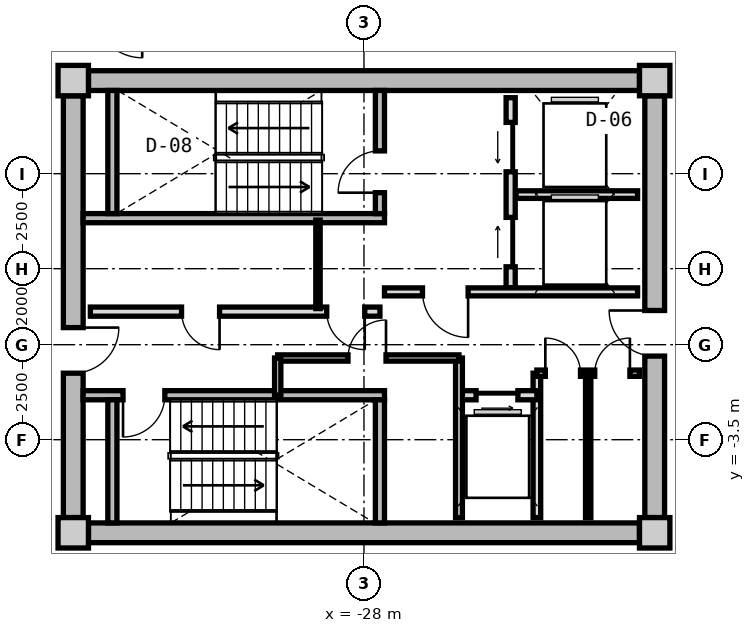
"""IFC4 building model, lengths in metres.
Left out: names, types, materials, properties, quantities, classifications, styles, units other than length and angle.
Written with IfcOpenShell. Run it as: python <this file> out.ifc"""

import sys

from ifc_helpers import new_model, si_unit, direction, frame, frame_2d, origin, origin_2d, place, context, subcontext, project, spatial, rectangle, extrude, source, transform, mapped, element, fill, save


model = new_model("IFC4")
c1 = context("Model", 3, precision=1e-05, world=origin(), true_north=direction((0.0, 1.0)))
c2 = subcontext(c1, "Body", "Model", "MODEL_VIEW")
j1 = project(units=[si_unit("LENGTHUNIT", "METRE"), si_unit("PLANEANGLEUNIT", "RADIAN")], contexts=[c1])
p1 = place(None, origin())
s1 = spatial("IfcSite", under=j1, at=p1, CompositionType="ELEMENT")
p2 = place(p1, origin())
s2 = spatial("IfcBuilding", under=s1, at=p2, CompositionType="ELEMENT")
p3 = place(p2, frame((0.0, 0.0, 199.8)))
s3 = spatial("IfcBuildingStorey", under=s2, at=p3, CompositionType="ELEMENT", Elevation=199.8)
m1 = source(origin(), c2, "Body", "SweptSolid", [
    extrude(rectangle(XDim=0.8, YDim=0.8, at=origin_2d()), origin(), (0.0, 0.0, 1.0), 4.0),
])
for number, where, z_axis, x_axis in (
    (1, (-35.65, -5.95, 0.0), (0.0, 0.0, 1.0), (1.0, 0.0, 0.0)),
    (2, (-20.35, -5.95, 0.0), (0.0, 0.0, 1.0), (1.0, 0.0, 0.0)),
    (3, (-20.35, 5.95, 0.0), (0.0, 0.0, 1.0), (1.0, 0.0, 0.0)),
    (4, (-35.65, 5.95, 0.0), (0.0, 0.0, 1.0), (1.0, 0.0, 0.0)),
):
    element("IfcColumn", number, at=place(p3, frame(where, z_axis=z_axis, x_axis=x_axis)), inside=s3, PredefinedType="COLUMN", context=c2, shape_type="MappedRepresentation", body=[
        mapped(m1, transform((0.0, 0.0, 0.0), x_axis=(1.0, 0.0, 0.0), y_axis=(0.0, 1.0, 0.0), z_axis=(0.0, 0.0, 1.0), scale=1.0)),
    ])
m2 = source(origin(), c2, "Body", "SweptSolid", [
    extrude(rectangle(XDim=14.5, YDim=0.52, at=frame_2d((7.25, 0.0))), origin(), (0.0, 0.0, 1.0), 3.71),
])
for number, where, z_axis, x_axis in (
    (5, (-35.25, 5.95, 0.0), (0.0, 0.0, 1.0), (1.0, 0.0, 0.0)),
    (6, (-20.75, -5.95, 0.0), (0.0, 0.0, 1.0), (-1.0, 0.0, 0.0)),
):
    element("IfcWall", number, at=place(p3, frame(where, z_axis=z_axis, x_axis=x_axis)), inside=s3, PredefinedType="SHEAR", context=c2, shape_type="MappedRepresentation", body=[
        mapped(m2, transform((0.0, 0.0, 0.0), x_axis=(1.0, 0.0, 0.0), y_axis=(0.0, 1.0, 0.0), z_axis=(0.0, 0.0, 1.0), scale=1.0)),
    ])
m3 = source(origin(), c2, "Body", "SweptSolid", [
    extrude(rectangle(XDim=11.1, YDim=0.52, at=frame_2d((5.55, 0.0))), origin(), (0.0, 0.0, 1.0), 3.71),
])
p4 = place(p3, frame((-35.65, -5.55, 0.0), z_axis=(0.0, 0.0, 1.0), x_axis=(0.0, 1.0, 0.0)))
e7 = element("IfcWall", 7, at=p4, inside=s3, PredefinedType="SHEAR", context=c2, shape_type="MappedRepresentation", body=[
    mapped(m3, transform((0.0, 0.0, 0.0), x_axis=(1.0, 0.0, 0.0), y_axis=(0.0, 1.0, 0.0), z_axis=(0.0, 0.0, 1.0), scale=1.0)),
])
p5 = place(p4, frame((3.8, 0.0, 0.0)))
e8 = element("IfcOpeningElement", 8, at=p5, cuts=e7, PredefinedType="OPENING", context=c2, shape_type="SweptSolid", body=[
    extrude(rectangle(XDim=1.2, YDim=2.15, at=frame_2d((0.6, 1.075))), frame((0.0, 0.27, 0.0), z_axis=(0.0, -1.0, 0.0), x_axis=(1.0, 0.0, 0.0)), (0.0, 0.0, 1.0), 0.54),
])
p6 = place(p3, frame((-20.35, 5.55, 0.0), z_axis=(0.0, 0.0, 1.0), x_axis=(0.0, -1.0, 0.0)))
e9 = element("IfcWall", 9, at=p6, inside=s3, PredefinedType="SHEAR", context=c2, shape_type="MappedRepresentation", body=[
    mapped(m3, transform((0.0, 0.0, 0.0), x_axis=(1.0, 0.0, 0.0), y_axis=(0.0, 1.0, 0.0), z_axis=(0.0, 0.0, 1.0), scale=1.0)),
])
p7 = place(p6, frame((5.65, 0.0, 0.0)))
e10 = element("IfcOpeningElement", 10, at=p7, cuts=e9, PredefinedType="OPENING", context=c2, shape_type="SweptSolid", body=[
    extrude(rectangle(XDim=1.2, YDim=2.15, at=frame_2d((0.6, 1.075))), frame((0.0, 0.27, 0.0), z_axis=(0.0, -1.0, 0.0), x_axis=(1.0, 0.0, 0.0)), (0.0, 0.0, 1.0), 0.54),
])
m4 = source(origin(), c2, "Body", "SweptSolid", [
    extrude(rectangle(XDim=7.93, YDim=0.24, at=frame_2d((3.965, 0.0))), origin(), (0.0, 0.0, 1.0), 3.71),
])
p8 = place(p3, frame((-35.39, 2.33, 0.0), z_axis=(0.0, 0.0, 1.0), x_axis=(1.0, 0.0, 0.0)))
e11 = element("IfcWall", 11, at=p8, inside=s3, PredefinedType="PARTITIONING", context=c2, shape_type="MappedRepresentation", body=[
    mapped(m4, transform((0.0, 0.0, 0.0), x_axis=(1.0, 0.0, 0.0), y_axis=(0.0, 1.0, 0.0), z_axis=(0.0, 0.0, 1.0), scale=1.0)),
])
m5 = source(origin(), c2, "Body", "SweptSolid", [
    extrude(rectangle(XDim=3.24, YDim=0.24, at=frame_2d((1.62, 0.0))), origin(), (0.0, 0.0, 1.0), 3.71),
])
p9 = place(p3, frame((-34.62, 2.45, 0.0), z_axis=(0.0, 0.0, 1.0), x_axis=(0.0, 1.0, 0.0)))
e12 = element("IfcWall", 12, at=p9, inside=s3, PredefinedType="PARTITIONING", context=c2, shape_type="MappedRepresentation", body=[
    mapped(m5, transform((0.0, 0.0, 0.0), x_axis=(1.0, 0.0, 0.0), y_axis=(0.0, 1.0, 0.0), z_axis=(0.0, 0.0, 1.0), scale=1.0)),
])
p10 = place(p3, frame((-27.58, 2.45, 0.0), z_axis=(0.0, 0.0, 1.0), x_axis=(0.0, 1.0, 0.0)))
e13 = element("IfcWall", 13, at=p10, inside=s3, PredefinedType="PARTITIONING", context=c2, shape_type="MappedRepresentation", body=[
    mapped(m5, transform((0.0, 0.0, 0.0), x_axis=(1.0, 0.0, 0.0), y_axis=(0.0, 1.0, 0.0), z_axis=(0.0, 0.0, 1.0), scale=1.0)),
])
p11 = place(p10, frame((0.55, 0.0, 0.0)))
e14 = element("IfcOpeningElement", 14, at=p11, cuts=e13, PredefinedType="OPENING", context=c2, shape_type="SweptSolid", body=[
    extrude(rectangle(XDim=1.1, YDim=2.15, at=frame_2d((0.55, 1.075))), frame((0.0, 0.13, 0.0), z_axis=(0.0, -1.0, 0.0), x_axis=(1.0, 0.0, 0.0)), (0.0, 0.0, 1.0), 0.26),
])
p12 = place(p3, frame((-35.39, -2.33, 0.0), z_axis=(0.0, 0.0, 1.0), x_axis=(1.0, 0.0, 0.0)))
e15 = element("IfcWall", 15, at=p12, inside=s3, PredefinedType="PARTITIONING", context=c2, shape_type="MappedRepresentation", body=[
    mapped(m4, transform((0.0, 0.0, 0.0), x_axis=(1.0, 0.0, 0.0), y_axis=(0.0, 1.0, 0.0), z_axis=(0.0, 0.0, 1.0), scale=1.0)),
])
p13 = place(p12, frame((1.05, 0.0, 0.0)))
e16 = element("IfcOpeningElement", 16, at=p13, cuts=e15, PredefinedType="OPENING", context=c2, shape_type="SweptSolid", body=[
    extrude(rectangle(XDim=1.1, YDim=2.15, at=frame_2d((0.55, 1.075))), frame((0.0, 0.13, 0.0), z_axis=(0.0, -1.0, 0.0), x_axis=(1.0, 0.0, 0.0)), (0.0, 0.0, 1.0), 0.26),
])
for number, where, z_axis, x_axis in (
    (17, (-34.62, -5.69, 0.0), (0.0, 0.0, 1.0), (0.0, 1.0, 0.0)),
    (18, (-27.58, -5.69, 0.0), (0.0, 0.0, 1.0), (0.0, 1.0, 0.0)),
):
    element("IfcWall", number, at=place(p3, frame(where, z_axis=z_axis, x_axis=x_axis)), inside=s3, PredefinedType="PARTITIONING", context=c2, shape_type="MappedRepresentation", body=[
        mapped(m5, transform((0.0, 0.0, 0.0), x_axis=(1.0, 0.0, 0.0), y_axis=(0.0, 1.0, 0.0), z_axis=(0.0, 0.0, 1.0), scale=1.0)),
    ])
m6 = source(origin(), c2, "Body", "SweptSolid", [
    extrude(rectangle(XDim=5.0, YDim=0.24, at=frame_2d((2.5, 0.0))), origin(), (0.0, 0.0, 1.0), 3.695),
])
p14 = place(p3, frame((-24.14, 0.5, 0.0), z_axis=(0.0, 0.0, 1.0), x_axis=(0.0, 1.0, 0.0)))
e19 = element("IfcWall", 19, at=p14, inside=s3, PredefinedType="PARTITIONING", context=c2, shape_type="MappedRepresentation", body=[
    mapped(m6, transform((0.0, 0.0, 0.0), x_axis=(1.0, 0.0, 0.0), y_axis=(0.0, 1.0, 0.0), z_axis=(0.0, 0.0, 1.0), scale=1.0)),
])
p15 = place(p14, frame((3.05, 0.0, 0.0)))
e20 = element("IfcOpeningElement", 20, at=p15, cuts=e19, PredefinedType="OPENING", context=c2, shape_type="SweptSolid", body=[
    extrude(rectangle(XDim=1.3, YDim=2.2, at=frame_2d((0.65, 1.1))), frame((0.0, 0.13, 0.0), z_axis=(0.0, -1.0, 0.0), x_axis=(1.0, 0.0, 0.0)), (0.0, 0.0, 1.0), 0.26),
])
p16 = place(p14, frame((0.55, 0.0, 0.0)))
e21 = element("IfcOpeningElement", 21, at=p16, cuts=e19, PredefinedType="OPENING", context=c2, shape_type="SweptSolid", body=[
    extrude(rectangle(XDim=1.3, YDim=2.2, at=frame_2d((0.65, 1.1))), frame((0.0, 0.13, 0.0), z_axis=(0.0, -1.0, 0.0), x_axis=(1.0, 0.0, 0.0)), (0.0, 0.0, 1.0), 0.26),
])
m7 = source(origin(), c2, "Body", "SweptSolid", [
    extrude(rectangle(XDim=3.2, YDim=0.2, at=frame_2d((1.6, 0.0))), origin(), (0.0, 0.0, 1.0), 3.695),
])
p17 = place(p3, frame((-24.0, 2.95, 0.0), z_axis=(0.0, 0.0, 1.0), x_axis=(1.0, 0.0, 0.0)))
e22 = element("IfcWall", 22, at=p17, inside=s3, PredefinedType="PARTITIONING", context=c2, shape_type="MappedRepresentation", body=[
    mapped(m7, transform((0.0, 0.0, 0.0), x_axis=(1.0, 0.0, 0.0), y_axis=(0.0, 1.0, 0.0), z_axis=(0.0, 0.0, 1.0), scale=1.0)),
])
m8 = source(origin(), c2, "Body", "SweptSolid", [
    extrude(rectangle(XDim=6.66, YDim=0.21, at=frame_2d((3.33, 0.0))), origin(), (0.0, 0.0, 1.0), 3.695),
])
p18 = place(p3, frame((-27.46, 0.39, 0.0), z_axis=(0.0, 0.0, 1.0), x_axis=(1.0, 0.0, 0.0)))
e23 = element("IfcWall", 23, at=p18, inside=s3, PredefinedType="PARTITIONING", context=c2, shape_type="MappedRepresentation", body=[
    mapped(m8, transform((0.0, 0.0, 0.0), x_axis=(1.0, 0.0, 0.0), y_axis=(0.0, 1.0, 0.0), z_axis=(0.0, 0.0, 1.0), scale=1.0)),
])
p19 = place(p18, frame((1.0, 0.0, 0.0)))
e24 = element("IfcOpeningElement", 24, at=p19, cuts=e23, PredefinedType="OPENING", context=c2, shape_type="SweptSolid", body=[
    extrude(rectangle(XDim=1.2, YDim=2.15, at=frame_2d((0.6, 1.075))), frame((0.0, 0.115, 0.0), z_axis=(0.0, -1.0, 0.0), x_axis=(1.0, 0.0, 0.0)), (0.0, 0.0, 1.0), 0.23),
])
m9 = source(origin(), c2, "Body", "SweptSolid", [
    extrude(rectangle(XDim=7.62, YDim=0.24, at=frame_2d((3.81, 0.0))), origin(), (0.0, 0.0, 1.0), 3.695),
])
p20 = place(p3, frame((-35.2, -0.13, 0.0), z_axis=(0.0, 0.0, 1.0), x_axis=(1.0, 0.0, 0.0)))
e25 = element("IfcWall", 25, at=p20, inside=s3, PredefinedType="PARTITIONING", context=c2, shape_type="MappedRepresentation", body=[
    mapped(m9, transform((0.0, 0.0, 0.0), x_axis=(1.0, 0.0, 0.0), y_axis=(0.0, 1.0, 0.0), z_axis=(0.0, 0.0, 1.0), scale=1.0)),
])
p21 = place(p20, frame((6.22, 0.0, 0.0)))
e26 = element("IfcOpeningElement", 26, at=p21, cuts=e25, PredefinedType="OPENING", context=c2, shape_type="SweptSolid", body=[
    extrude(rectangle(XDim=1.0, YDim=2.1, at=frame_2d((0.5, 1.05))), frame((0.0, 0.13, 0.0), z_axis=(0.0, -1.0, 0.0), x_axis=(1.0, 0.0, 0.0)), (0.0, 0.0, 1.0), 0.26),
])
p22 = place(p20, frame((2.4, 0.0, 0.0)))
e27 = element("IfcOpeningElement", 27, at=p22, cuts=e25, PredefinedType="OPENING", context=c2, shape_type="SweptSolid", body=[
    extrude(rectangle(XDim=1.0, YDim=2.1, at=frame_2d((0.5, 1.05))), frame((0.0, 0.13, 0.0), z_axis=(0.0, -1.0, 0.0), x_axis=(1.0, 0.0, 0.0)), (0.0, 0.0, 1.0), 0.26),
])
m10 = source(origin(), c2, "Body", "SweptSolid", [
    extrude(rectangle(XDim=2.33, YDim=0.115, at=frame_2d((1.165, 0.0))), origin(), (0.0, 0.0, 1.0), 3.695),
])
p23 = place(p3, frame((-29.21, -0.05, 0.0), z_axis=(0.0, 0.0, 1.0), x_axis=(0.0, 1.0, 0.0)))
e28 = element("IfcWall", 28, at=p23, inside=s3, PredefinedType="PARTITIONING", context=c2, shape_type="MappedRepresentation", body=[
    mapped(m10, transform((0.0, 0.0, 0.0), x_axis=(1.0, 0.0, 0.0), y_axis=(0.0, 1.0, 0.0), z_axis=(0.0, 0.0, 1.0), scale=1.0)),
])
m11 = source(origin(), c2, "Body", "SweptSolid", [
    extrude(rectangle(XDim=3.8, YDim=0.2, at=frame_2d((1.9, 0.0))), origin(), (0.0, 0.0, 1.0), 3.695),
])
p24 = place(p3, frame((-23.45, -5.55, 0.0), z_axis=(0.0, 0.0, 1.0), x_axis=(0.0, 1.0, 0.0)))
e29 = element("IfcWall", 29, at=p24, inside=s3, PredefinedType="PARTITIONING", context=c2, shape_type="MappedRepresentation", body=[
    mapped(m11, transform((0.0, 0.0, 0.0), x_axis=(1.0, 0.0, 0.0), y_axis=(0.0, 1.0, 0.0), z_axis=(0.0, 0.0, 1.0), scale=1.0)),
])
m12 = source(origin(), c2, "Body", "SweptSolid", [
    extrude(rectangle(XDim=2.05, YDim=0.24, at=frame_2d((1.025, 0.0))), origin(), (0.0, 0.0, 1.0), 3.695),
])
p25 = place(p3, frame((-25.5, -2.33, 0.0), z_axis=(0.0, 0.0, 1.0), x_axis=(1.0, 0.0, 0.0)))
e30 = element("IfcWall", 30, at=p25, inside=s3, PredefinedType="PARTITIONING", context=c2, shape_type="MappedRepresentation", body=[
    mapped(m12, transform((0.0, 0.0, 0.0), x_axis=(1.0, 0.0, 0.0), y_axis=(0.0, 1.0, 0.0), z_axis=(0.0, 0.0, 1.0), scale=1.0)),
])
p26 = place(p25, frame((0.45, 0.0, 0.0)))
e31 = element("IfcOpeningElement", 31, at=p26, cuts=e30, PredefinedType="OPENING", context=c2, shape_type="SweptSolid", body=[
    extrude(rectangle(XDim=1.1, YDim=2.2, at=frame_2d((0.55, 1.1))), frame((0.0, 0.13, 0.0), z_axis=(0.0, -1.0, 0.0), x_axis=(1.0, 0.0, 0.0)), (0.0, 0.0, 1.0), 0.26),
])
m13 = source(origin(), c2, "Body", "SweptSolid", [
    extrude(rectangle(XDim=4.2, YDim=0.18, at=frame_2d((2.1, 0.0))), origin(), (0.0, 0.0, 1.0), 3.695),
])
p27 = place(p3, frame((-25.5, -5.55, 0.0), z_axis=(0.0, 0.0, 1.0), x_axis=(0.0, 1.0, 0.0)))
e32 = element("IfcWall", 32, at=p27, inside=s3, PredefinedType="PARTITIONING", context=c2, shape_type="MappedRepresentation", body=[
    mapped(m13, transform((0.0, 0.0, 0.0), x_axis=(1.0, 0.0, 0.0), y_axis=(0.0, 1.0, 0.0), z_axis=(0.0, 0.0, 1.0), scale=1.0)),
])
m14 = source(origin(), c2, "Body", "SweptSolid", [
    extrude(rectangle(XDim=4.77, YDim=0.165, at=frame_2d((2.385, 0.0))), origin(), (0.0, 0.0, 1.0), 3.695),
])
p28 = place(p3, frame((-30.27, -1.35, 0.0), z_axis=(0.0, 0.0, 1.0), x_axis=(1.0, 0.0, 0.0)))
e33 = element("IfcWall", 33, at=p28, inside=s3, PredefinedType="PARTITIONING", context=c2, shape_type="MappedRepresentation", body=[
    mapped(m14, transform((0.0, 0.0, 0.0), x_axis=(1.0, 0.0, 0.0), y_axis=(0.0, 1.0, 0.0), z_axis=(0.0, 0.0, 1.0), scale=1.0)),
])
p29 = place(p28, frame((1.85, 0.0, 0.0)))
e34 = element("IfcOpeningElement", 34, at=p29, cuts=e33, PredefinedType="OPENING", context=c2, shape_type="SweptSolid", body=[
    extrude(rectangle(XDim=1.0, YDim=2.1, at=frame_2d((0.5, 1.05))), frame((0.0, 0.093, 0.0), z_axis=(0.0, -1.0, 0.0), x_axis=(1.0, 0.0, 0.0)), (0.0, 0.0, 1.0), 0.185),
])
m15 = source(origin(), c2, "Body", "SweptSolid", [
    extrude(rectangle(XDim=0.98, YDim=0.165, at=frame_2d((0.49, 0.0))), origin(), (0.0, 0.0, 1.0), 3.695),
])
p30 = place(p3, frame((-30.27, -2.33, 0.0), z_axis=(0.0, 0.0, 1.0), x_axis=(0.0, 1.0, 0.0)))
e35 = element("IfcWall", 35, at=p30, inside=s3, PredefinedType="PARTITIONING", context=c2, shape_type="MappedRepresentation", body=[
    mapped(m15, transform((0.0, 0.0, 0.0), x_axis=(1.0, 0.0, 0.0), y_axis=(0.0, 1.0, 0.0), z_axis=(0.0, 0.0, 1.0), scale=1.0)),
])
m16 = source(origin(), c2, "Body", "SweptSolid", [
    extrude(rectangle(XDim=2.7, YDim=0.165, at=frame_2d((1.35, 0.0))), origin(), (0.0, 0.0, 1.0), 3.695),
])
p31 = place(p3, frame((-23.45, -1.75, 0.0), z_axis=(0.0, 0.0, 1.0), x_axis=(1.0, 0.0, 0.0)))
e36 = element("IfcWall", 36, at=p31, inside=s3, PredefinedType="PARTITIONING", context=c2, shape_type="MappedRepresentation", body=[
    mapped(m16, transform((0.0, 0.0, 0.0), x_axis=(1.0, 0.0, 0.0), y_axis=(0.0, 1.0, 0.0), z_axis=(0.0, 0.0, 1.0), scale=1.0)),
])
p32 = place(p31, frame((0.222, 0.0, 0.0)))
e37 = element("IfcOpeningElement", 37, at=p32, cuts=e36, PredefinedType="OPENING", context=c2, shape_type="SweptSolid", body=[
    extrude(rectangle(XDim=0.925, YDim=2.1, at=frame_2d((0.462, 1.05))), frame((0.0, 0.093, 0.0), z_axis=(0.0, -1.0, 0.0), x_axis=(1.0, 0.0, 0.0)), (0.0, 0.0, 1.0), 0.185),
])
p33 = place(p31, frame((1.522, 0.0, 0.0)))
e38 = element("IfcOpeningElement", 38, at=p33, cuts=e36, PredefinedType="OPENING", context=c2, shape_type="SweptSolid", body=[
    extrude(rectangle(XDim=0.925, YDim=2.1, at=frame_2d((0.462, 1.05))), frame((0.0, 0.093, 0.0), z_axis=(0.0, -1.0, 0.0), x_axis=(1.0, 0.0, 0.0)), (0.0, 0.0, 1.0), 0.185),
])
m17 = source(origin(), c2, "Body", "SweptSolid", [
    extrude(rectangle(XDim=3.8, YDim=0.14, at=frame_2d((1.9, 0.0))), origin(), (0.0, 0.0, 1.0), 3.695),
])
p34 = place(p3, frame((-22.1, -5.55, 0.0), z_axis=(0.0, 0.0, 1.0), x_axis=(0.0, 1.0, 0.0)))
e39 = element("IfcWall", 39, at=p34, inside=s3, PredefinedType="PARTITIONING", context=c2, shape_type="MappedRepresentation", body=[
    mapped(m17, transform((0.0, 0.0, 0.0), x_axis=(1.0, 0.0, 0.0), y_axis=(0.0, 1.0, 0.0), z_axis=(0.0, 0.0, 1.0), scale=1.0)),
])
m18 = source(origin(), c2, "Body", "SweptSolid", [
    extrude(rectangle(XDim=1.1, YDim=2.15, at=frame_2d((0.55, 1.075))), frame((0.0, 0.025, 0.0), z_axis=(0.0, -1.0, 0.0), x_axis=(1.0, 0.0, 0.0)), (0.0, 0.0, 1.0), 0.05),
])
p35 = place(p11, origin())
e40 = element("IfcDoor", 40, at=p35, inside=s3, OperationType="SINGLE_SWING_LEFT", PredefinedType="DOOR", context=c2, shape_type="MappedRepresentation", body=[
    mapped(m18, transform((0.0, 0.0, 0.0), x_axis=(1.0, 0.0, 0.0), y_axis=(0.0, 1.0, 0.0), z_axis=(0.0, 0.0, 1.0), scale=1.0)),
])
fill(e14, e40)
p36 = place(p13, frame((1.1, 0.0, 0.0), z_axis=(0.0, 0.0, 1.0), x_axis=(-1.0, 0.0, 0.0)))
e41 = element("IfcDoor", 41, at=p36, inside=s3, OperationType="SINGLE_SWING_RIGHT", PredefinedType="DOOR", context=c2, shape_type="MappedRepresentation", body=[
    mapped(m18, transform((0.0, 0.0, 0.0), x_axis=(1.0, 0.0, 0.0), y_axis=(0.0, 1.0, 0.0), z_axis=(0.0, 0.0, 1.0), scale=1.0)),
])
fill(e16, e41)
m19 = source(origin(), c2, "Body", "SweptSolid", [
    extrude(rectangle(XDim=1.3, YDim=2.2, at=frame_2d((0.65, 1.1))), frame((0.0, 0.025, 0.0), z_axis=(0.0, -1.0, 0.0), x_axis=(1.0, 0.0, 0.0)), (0.0, 0.0, 1.0), 0.05),
])
p37 = place(p15, origin())
e42 = element("IfcDoor", 42, at=p37, inside=s3, OperationType="SLIDING_TO_LEFT", PredefinedType="DOOR", context=c2, shape_type="MappedRepresentation", body=[
    mapped(m19, transform((0.0, 0.0, 0.0), x_axis=(1.0, 0.0, 0.0), y_axis=(0.0, 1.0, 0.0), z_axis=(0.0, 0.0, 1.0), scale=1.0)),
])
fill(e20, e42)
p38 = place(p16, origin())
e43 = element("IfcDoor", 43, at=p38, inside=s3, OperationType="SLIDING_TO_RIGHT", PredefinedType="DOOR", context=c2, shape_type="MappedRepresentation", body=[
    mapped(m19, transform((0.0, 0.0, 0.0), x_axis=(1.0, 0.0, 0.0), y_axis=(0.0, 1.0, 0.0), z_axis=(0.0, 0.0, 1.0), scale=1.0)),
])
fill(e21, e43)
m20 = source(origin(), c2, "Body", "SweptSolid", [
    extrude(rectangle(XDim=1.2, YDim=2.15, at=frame_2d((0.6, 1.075))), frame((0.0, 0.025, 0.0), z_axis=(0.0, -1.0, 0.0), x_axis=(1.0, 0.0, 0.0)), (0.0, 0.0, 1.0), 0.05),
])
p39 = place(p19, frame((1.2, 0.0, 0.0), z_axis=(0.0, 0.0, 1.0), x_axis=(-1.0, 0.0, 0.0)))
e44 = element("IfcDoor", 44, at=p39, inside=s3, OperationType="SINGLE_SWING_LEFT", PredefinedType="DOOR", context=c2, shape_type="MappedRepresentation", body=[
    mapped(m20, transform((0.0, 0.0, 0.0), x_axis=(1.0, 0.0, 0.0), y_axis=(0.0, 1.0, 0.0), z_axis=(0.0, 0.0, 1.0), scale=1.0)),
])
fill(e24, e44)
p40 = place(p5, frame((1.2, 0.0, 0.0), z_axis=(0.0, 0.0, 1.0), x_axis=(-1.0, 0.0, 0.0)))
e45 = element("IfcDoor", 45, at=p40, inside=s3, OperationType="SINGLE_SWING_LEFT", PredefinedType="DOOR", context=c2, shape_type="MappedRepresentation", body=[
    mapped(m20, transform((0.0, 0.0, 0.0), x_axis=(1.0, 0.0, 0.0), y_axis=(0.0, 1.0, 0.0), z_axis=(0.0, 0.0, 1.0), scale=1.0)),
])
fill(e8, e45)
p41 = place(p7, frame((1.2, 0.0, 0.0), z_axis=(0.0, 0.0, 1.0), x_axis=(-1.0, 0.0, 0.0)))
e46 = element("IfcDoor", 46, at=p41, inside=s3, OperationType="SINGLE_SWING_RIGHT", PredefinedType="DOOR", context=c2, shape_type="MappedRepresentation", body=[
    mapped(m20, transform((0.0, 0.0, 0.0), x_axis=(1.0, 0.0, 0.0), y_axis=(0.0, 1.0, 0.0), z_axis=(0.0, 0.0, 1.0), scale=1.0)),
])
fill(e10, e46)
m21 = source(origin(), c2, "Body", "SweptSolid", [
    extrude(rectangle(XDim=1.0, YDim=2.1, at=frame_2d((0.5, 1.05))), frame((0.0, 0.025, 0.0), z_axis=(0.0, -1.0, 0.0), x_axis=(1.0, 0.0, 0.0)), (0.0, 0.0, 1.0), 0.05),
])
p42 = place(p21, frame((1.0, 0.0, 0.0), z_axis=(0.0, 0.0, 1.0), x_axis=(-1.0, 0.0, 0.0)))
e47 = element("IfcDoor", 47, at=p42, inside=s3, OperationType="SINGLE_SWING_LEFT", PredefinedType="DOOR", context=c2, shape_type="MappedRepresentation", body=[
    mapped(m21, transform((0.0, 0.0, 0.0), x_axis=(1.0, 0.0, 0.0), y_axis=(0.0, 1.0, 0.0), z_axis=(0.0, 0.0, 1.0), scale=1.0)),
])
fill(e26, e47)
p43 = place(p22, frame((1.0, 0.0, 0.0), z_axis=(0.0, 0.0, 1.0), x_axis=(-1.0, 0.0, 0.0)))
e48 = element("IfcDoor", 48, at=p43, inside=s3, OperationType="SINGLE_SWING_LEFT", PredefinedType="DOOR", context=c2, shape_type="MappedRepresentation", body=[
    mapped(m21, transform((0.0, 0.0, 0.0), x_axis=(1.0, 0.0, 0.0), y_axis=(0.0, 1.0, 0.0), z_axis=(0.0, 0.0, 1.0), scale=1.0)),
])
fill(e27, e48)
m22 = source(origin(), c2, "Body", "SweptSolid", [
    extrude(rectangle(XDim=1.1, YDim=2.2, at=frame_2d((0.55, 1.1))), frame((0.0, 0.025, 0.0), z_axis=(0.0, -1.0, 0.0), x_axis=(1.0, 0.0, 0.0)), (0.0, 0.0, 1.0), 0.05),
])
p44 = place(p26, frame((1.1, 0.0, 0.0), z_axis=(0.0, 0.0, 1.0), x_axis=(-1.0, 0.0, 0.0)))
e49 = element("IfcDoor", 49, at=p44, inside=s3, OperationType="SLIDING_TO_RIGHT", PredefinedType="DOOR", context=c2, shape_type="MappedRepresentation", body=[
    mapped(m22, transform((0.0, 0.0, 0.0), x_axis=(1.0, 0.0, 0.0), y_axis=(0.0, 1.0, 0.0), z_axis=(0.0, 0.0, 1.0), scale=1.0)),
])
fill(e31, e49)
p45 = place(p29, origin())
e50 = element("IfcDoor", 50, at=p45, inside=s3, OperationType="SINGLE_SWING_RIGHT", PredefinedType="DOOR", context=c2, shape_type="MappedRepresentation", body=[
    mapped(m21, transform((0.0, 0.0, 0.0), x_axis=(1.0, 0.0, 0.0), y_axis=(0.0, 1.0, 0.0), z_axis=(0.0, 0.0, 1.0), scale=1.0)),
])
fill(e34, e50)
m23 = source(origin(), c2, "Body", "SweptSolid", [
    extrude(rectangle(XDim=0.925, YDim=2.1, at=frame_2d((0.462, 1.05))), frame((0.0, 0.025, 0.0), z_axis=(0.0, -1.0, 0.0), x_axis=(1.0, 0.0, 0.0)), (0.0, 0.0, 1.0), 0.05),
])
p46 = place(p32, origin())
e51 = element("IfcDoor", 51, at=p46, inside=s3, OperationType="SINGLE_SWING_LEFT", PredefinedType="DOOR", context=c2, shape_type="MappedRepresentation", body=[
    mapped(m23, transform((0.0, 0.0, 0.0), x_axis=(1.0, 0.0, 0.0), y_axis=(0.0, 1.0, 0.0), z_axis=(0.0, 0.0, 1.0), scale=1.0)),
])
fill(e37, e51)
p47 = place(p33, origin())
e52 = element("IfcDoor", 52, at=p47, inside=s3, OperationType="SINGLE_SWING_RIGHT", PredefinedType="DOOR", context=c2, shape_type="MappedRepresentation", body=[
    mapped(m23, transform((0.0, 0.0, 0.0), x_axis=(1.0, 0.0, 0.0), y_axis=(0.0, 1.0, 0.0), z_axis=(0.0, 0.0, 1.0), scale=1.0)),
])
fill(e38, e52)
save(model, sys.argv[1])
